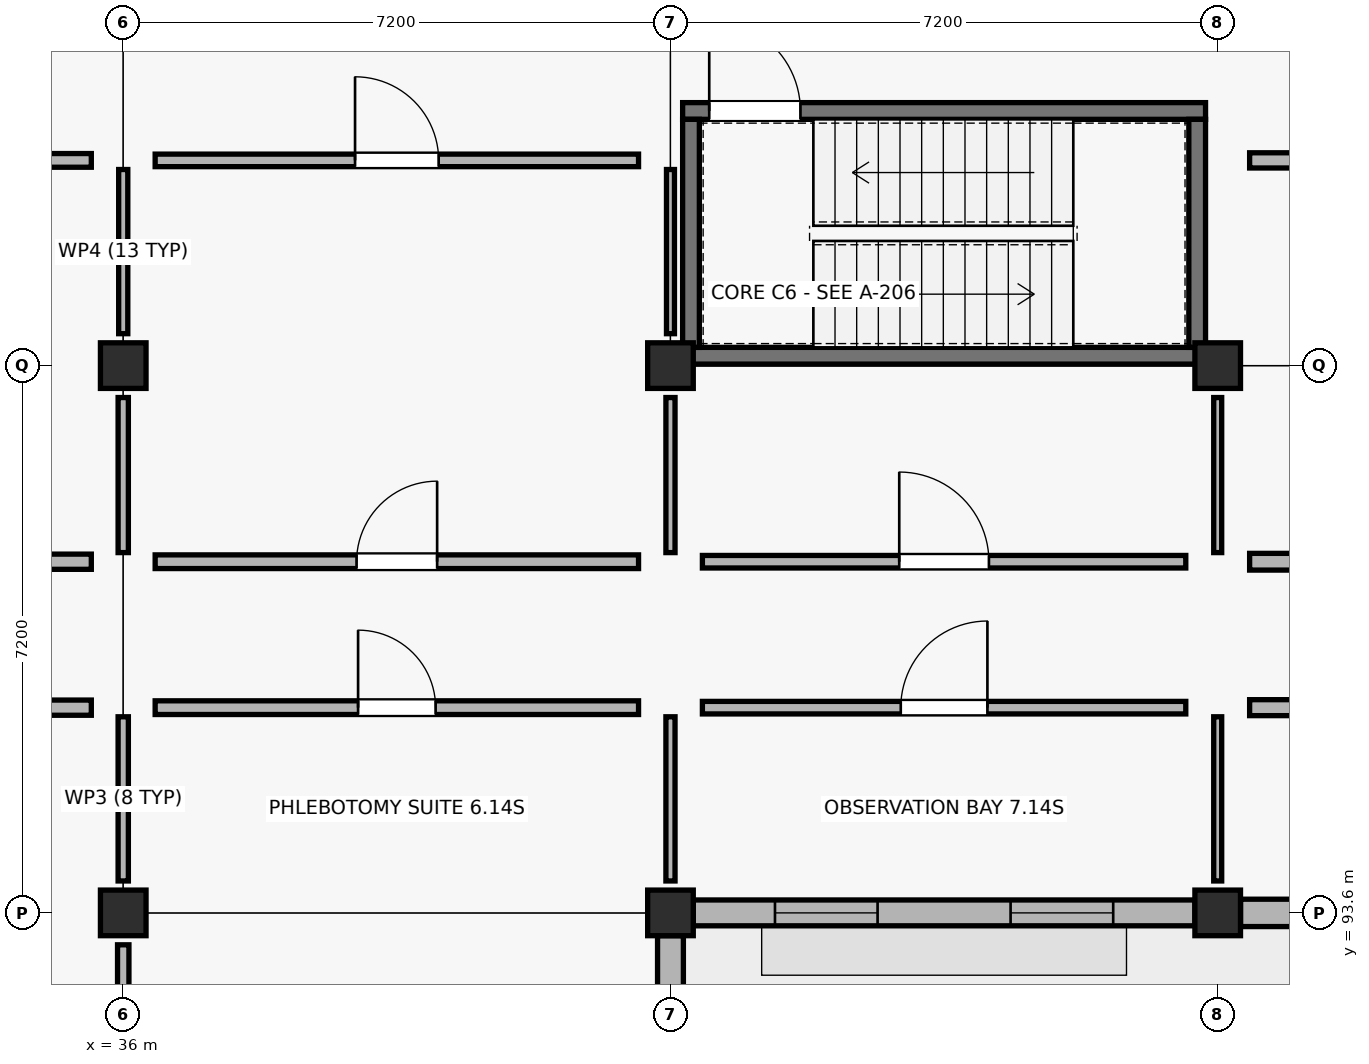
"""IFC4 building model, lengths in metres.
Left out: names, types, materials, properties, quantities, classifications, styles, units other than length and angle.
Written with IfcOpenShell. Run it as: python <this file> out.ifc"""

import sys

from ifc_helpers import new_model, si_unit, direction, frame, frame_2d, origin, origin_2d, place, context, subcontext, project, spatial, rectangle, extrude, element, fill, save


model = new_model("IFC4")
c1 = context("Model", 3, precision=1e-05, world=origin(), true_north=direction((0.0, 1.0)))
c2 = subcontext(c1, "Body", "Model", "MODEL_VIEW")
j1 = project(units=[si_unit("LENGTHUNIT", "METRE"), si_unit("PLANEANGLEUNIT", "RADIAN")], contexts=[c1])
p1 = place(None, origin())
s1 = spatial("IfcSite", under=j1, at=p1, CompositionType="ELEMENT")
p2 = place(p1, origin())
s2 = spatial("IfcBuilding", under=s1, at=p2, CompositionType="ELEMENT")
p3 = place(p2, origin())
s3 = spatial("IfcBuildingStorey", under=s2, at=p3, CompositionType="ELEMENT", Elevation=0.0)
for number, where, z_axis, x_axis in (
    (1, (36.0, 93.6, -0.25), (0.0, 0.0, 1.0), (1.0, 0.0, 0.0)),
    (2, (36.0, 100.8, -0.25), (0.0, 0.0, 1.0), (1.0, 0.0, 0.0)),
    (3, (43.2, 93.6, -0.25), (0.0, 0.0, 1.0), (1.0, 0.0, 0.0)),
    (4, (43.2, 100.8, -0.25), (0.0, 0.0, 1.0), (1.0, 0.0, 0.0)),
    (5, (50.4, 93.6, -0.25), (0.0, 0.0, 1.0), (1.0, 0.0, 0.0)),
    (6, (50.4, 100.8, -0.25), (0.0, 0.0, 1.0), (1.0, 0.0, 0.0)),
):
    element("IfcColumn", number, at=place(p3, frame(where, z_axis=z_axis, x_axis=x_axis)), inside=s3, PredefinedType="COLUMN", context=c2, shape_type="SweptSolid", body=[
        extrude(rectangle(XDim=0.6, YDim=0.6, at=origin_2d()), origin(), (0.0, 0.0, 1.0), 4.75),
    ])
p4 = place(p3, frame((43.2, 86.7, 0.0), z_axis=(0.0, 0.0, 1.0), x_axis=(0.0, 1.0, 0.0)))
e7 = element("IfcWall", 7, at=p4, inside=s3, PredefinedType="SOLIDWALL", context=c2, shape_type="SweptSolid", body=[
    extrude(rectangle(XDim=6.6, YDim=0.34, at=frame_2d((3.3, 0.0))), origin(), (0.0, 0.0, 1.0), 3.52),
])
p5 = place(p4, frame((0.85, 0.0, 0.9)))
e8 = element("IfcOpeningElement", 8, at=p5, cuts=e7, PredefinedType="OPENING", context=c2, shape_type="SweptSolid", body=[
    extrude(rectangle(XDim=1.8, YDim=1.62, at=frame_2d((0.9, 0.81))), frame((0.0, 0.18, 0.0), z_axis=(0.0, -1.0, 0.0), x_axis=(1.0, 0.0, 0.0)), (0.0, 0.0, 1.0), 0.36),
])
p6 = place(p4, frame((3.95, 0.0, 0.9)))
e9 = element("IfcOpeningElement", 9, at=p6, cuts=e7, PredefinedType="OPENING", context=c2, shape_type="SweptSolid", body=[
    extrude(rectangle(XDim=1.8, YDim=1.62, at=frame_2d((0.9, 0.81))), frame((0.0, 0.18, 0.0), z_axis=(0.0, -1.0, 0.0), x_axis=(1.0, 0.0, 0.0)), (0.0, 0.0, 1.0), 0.36),
])
p7 = place(p3, frame((43.5, 93.6, 0.0), z_axis=(0.0, 0.0, 1.0), x_axis=(1.0, 0.0, 0.0)))
e10 = element("IfcWall", 10, at=p7, inside=s3, PredefinedType="SOLIDWALL", context=c2, shape_type="SweptSolid", body=[
    extrude(rectangle(XDim=6.6, YDim=0.34, at=frame_2d((3.3, 0.0))), origin(), (0.0, 0.0, 1.0), 3.47),
])
p8 = place(p7, frame((1.075, 0.0, 0.9)))
e11 = element("IfcOpeningElement", 11, at=p8, cuts=e10, PredefinedType="OPENING", context=c2, shape_type="SweptSolid", body=[
    extrude(rectangle(XDim=1.35, YDim=1.75, at=frame_2d((0.675, 0.875))), frame((0.0, 0.18, 0.0), z_axis=(0.0, -1.0, 0.0), x_axis=(1.0, 0.0, 0.0)), (0.0, 0.0, 1.0), 0.36),
])
p9 = place(p7, frame((4.175, 0.0, 0.9)))
e12 = element("IfcOpeningElement", 12, at=p9, cuts=e10, PredefinedType="OPENING", context=c2, shape_type="SweptSolid", body=[
    extrude(rectangle(XDim=1.35, YDim=1.75, at=frame_2d((0.675, 0.875))), frame((0.0, 0.18, 0.0), z_axis=(0.0, -1.0, 0.0), x_axis=(1.0, 0.0, 0.0)), (0.0, 0.0, 1.0), 0.36),
])
p10 = place(p3, frame((50.7, 93.6, 0.0), z_axis=(0.0, 0.0, 1.0), x_axis=(1.0, 0.0, 0.0)))
e13 = element("IfcWall", 13, at=p10, inside=s3, PredefinedType="SOLIDWALL", context=c2, shape_type="SweptSolid", body=[
    extrude(rectangle(XDim=6.6, YDim=0.36, at=frame_2d((3.3, 0.0))), origin(), (0.0, 0.0, 1.0), 3.47),
])
p11 = place(p10, frame((0.675, 0.0, 0.9)))
e14 = element("IfcOpeningElement", 14, at=p11, cuts=e13, PredefinedType="OPENING", context=c2, shape_type="SweptSolid", body=[
    extrude(rectangle(XDim=2.15, YDim=1.75, at=frame_2d((1.075, 0.875))), frame((0.0, 0.19, 0.0), z_axis=(0.0, -1.0, 0.0), x_axis=(1.0, 0.0, 0.0)), (0.0, 0.0, 1.0), 0.38),
])
p12 = place(p10, frame((3.775, 0.0, 0.9)))
e15 = element("IfcOpeningElement", 15, at=p12, cuts=e13, PredefinedType="OPENING", context=c2, shape_type="SweptSolid", body=[
    extrude(rectangle(XDim=2.15, YDim=1.75, at=frame_2d((1.075, 0.875))), frame((0.0, 0.19, 0.0), z_axis=(0.0, -1.0, 0.0), x_axis=(1.0, 0.0, 0.0)), (0.0, 0.0, 1.0), 0.38),
])
p13 = place(p3, frame((43.36, 100.93, -0.25), z_axis=(0.0, 0.0, 1.0), x_axis=(1.0, 0.0, 0.0)))
e16 = element("IfcWall", 16, at=p13, inside=s3, PredefinedType="SHEAR", context=c2, shape_type="SweptSolid", body=[
    extrude(rectangle(XDim=6.88, YDim=0.22, at=frame_2d((3.44, 0.0))), origin(), (0.0, 0.0, 1.0), 4.47),
])
p14 = place(p3, frame((43.36, 104.15, -0.25), z_axis=(0.0, 0.0, 1.0), x_axis=(1.0, 0.0, 0.0)))
e17 = element("IfcWall", 17, at=p14, inside=s3, PredefinedType="SHEAR", context=c2, shape_type="SweptSolid", body=[
    extrude(rectangle(XDim=6.88, YDim=0.22, at=frame_2d((3.44, 0.0))), origin(), (0.0, 0.0, 1.0), 4.47),
])
p15 = place(p14, frame((0.35, 0.0, 0.25)))
e18 = element("IfcOpeningElement", 18, at=p15, cuts=e17, PredefinedType="OPENING", context=c2, shape_type="SweptSolid", body=[
    extrude(rectangle(XDim=1.2, YDim=2.15, at=frame_2d((0.6, 1.075))), frame((0.0, 0.12, 0.0), z_axis=(0.0, -1.0, 0.0), x_axis=(1.0, 0.0, 0.0)), (0.0, 0.0, 1.0), 0.24),
])
for number, where, z_axis, x_axis in (
    (19, (43.47, 101.04, -0.25), (0.0, 0.0, 1.0), (0.0, 1.0, 0.0)),
    (20, (50.13, 101.04, -0.25), (0.0, 0.0, 1.0), (0.0, 1.0, 0.0)),
):
    element("IfcWall", number, at=place(p3, frame(where, z_axis=z_axis, x_axis=x_axis)), inside=s3, PredefinedType="SHEAR", context=c2, shape_type="SweptSolid", body=[
        extrude(rectangle(XDim=3.0, YDim=0.22, at=frame_2d((1.5, 0.0))), origin(), (0.0, 0.0, 1.0), 4.47),
    ])
p16 = place(p3, frame((36.0, 91.14, 0.0), z_axis=(0.0, 0.0, 1.0), x_axis=(0.0, 1.0, 0.0)))
e21 = element("IfcWall", 21, at=p16, inside=s3, PredefinedType="PARTITIONING", context=c2, shape_type="SweptSolid", body=[
    extrude(rectangle(XDim=2.04, YDim=0.15, at=frame_2d((1.02, 0.0))), origin(), (0.0, 0.0, 1.0), 3.36),
])
p17 = place(p3, frame((29.22, 96.3, 0.0), z_axis=(0.0, 0.0, 1.0), x_axis=(1.0, 0.0, 0.0)))
e22 = element("IfcWall", 22, at=p17, inside=s3, PredefinedType="SOLIDWALL", context=c2, shape_type="SweptSolid", body=[
    extrude(rectangle(XDim=6.36, YDim=0.2, at=frame_2d((3.18, 0.0))), origin(), (0.0, 0.0, 1.0), 3.36),
])
p18 = place(p17, frame((2.51, 0.0, 0.0)))
e23 = element("IfcOpeningElement", 23, at=p18, cuts=e22, PredefinedType="OPENING", context=c2, shape_type="SweptSolid", body=[
    extrude(rectangle(XDim=1.34, YDim=2.09, at=frame_2d((0.67, 1.045))), frame((0.0, 0.11, 0.0), z_axis=(0.0, -1.0, 0.0), x_axis=(1.0, 0.0, 0.0)), (0.0, 0.0, 1.0), 0.22),
])
p19 = place(p3, frame((36.0, 94.02, 0.0), z_axis=(0.0, 0.0, 1.0), x_axis=(0.0, 1.0, 0.0)))
e24 = element("IfcWall", 24, at=p19, inside=s3, PredefinedType="PARTITIONING", context=c2, shape_type="SweptSolid", body=[
    extrude(rectangle(XDim=2.16, YDim=0.135, at=frame_2d((1.08, 0.0))), origin(), (0.0, 0.0, 1.0), 3.36),
])
p20 = place(p3, frame((29.22, 98.22, 0.0), z_axis=(0.0, 0.0, 1.0), x_axis=(1.0, 0.0, 0.0)))
e25 = element("IfcWall", 25, at=p20, inside=s3, PredefinedType="SOLIDWALL", context=c2, shape_type="SweptSolid", body=[
    extrude(rectangle(XDim=6.36, YDim=0.2, at=frame_2d((3.18, 0.0))), origin(), (0.0, 0.0, 1.0), 3.36),
])
p21 = place(p20, frame((2.49, 0.0, 0.0)))
e26 = element("IfcOpeningElement", 26, at=p21, cuts=e25, PredefinedType="OPENING", context=c2, shape_type="SweptSolid", body=[
    extrude(rectangle(XDim=1.38, YDim=2.09, at=frame_2d((0.69, 1.045))), frame((0.0, 0.11, 0.0), z_axis=(0.0, -1.0, 0.0), x_axis=(1.0, 0.0, 0.0)), (0.0, 0.0, 1.0), 0.22),
])
p22 = place(p3, frame((36.0, 98.34, 0.0), z_axis=(0.0, 0.0, 1.0), x_axis=(0.0, 1.0, 0.0)))
e27 = element("IfcWall", 27, at=p22, inside=s3, PredefinedType="PARTITIONING", context=c2, shape_type="SweptSolid", body=[
    extrude(rectangle(XDim=2.04, YDim=0.135, at=frame_2d((1.02, 0.0))), origin(), (0.0, 0.0, 1.0), 3.36),
])
p23 = place(p3, frame((29.22, 103.5, 0.0), z_axis=(0.0, 0.0, 1.0), x_axis=(1.0, 0.0, 0.0)))
e28 = element("IfcWall", 28, at=p23, inside=s3, PredefinedType="PARTITIONING", context=c2, shape_type="SweptSolid", body=[
    extrude(rectangle(XDim=6.36, YDim=0.18, at=frame_2d((3.18, 0.0))), origin(), (0.0, 0.0, 1.0), 3.36),
])
p24 = place(p23, frame((2.47, 0.0, 0.0)))
e29 = element("IfcOpeningElement", 29, at=p24, cuts=e28, PredefinedType="OPENING", context=c2, shape_type="SweptSolid", body=[
    extrude(rectangle(XDim=1.42, YDim=2.09, at=frame_2d((0.71, 1.045))), frame((0.0, 0.1, 0.0), z_axis=(0.0, -1.0, 0.0), x_axis=(1.0, 0.0, 0.0)), (0.0, 0.0, 1.0), 0.2),
])
p25 = place(p3, frame((36.0, 101.22, 0.0), z_axis=(0.0, 0.0, 1.0), x_axis=(0.0, 1.0, 0.0)))
e30 = element("IfcWall", 30, at=p25, inside=s3, PredefinedType="PARTITIONING", context=c2, shape_type="SweptSolid", body=[
    extrude(rectangle(XDim=2.16, YDim=0.12, at=frame_2d((1.08, 0.0))), origin(), (0.0, 0.0, 1.0), 3.36),
])
p26 = place(p3, frame((36.42, 96.3, 0.0), z_axis=(0.0, 0.0, 1.0), x_axis=(1.0, 0.0, 0.0)))
e31 = element("IfcWall", 31, at=p26, inside=s3, PredefinedType="PARTITIONING", context=c2, shape_type="SweptSolid", body=[
    extrude(rectangle(XDim=6.36, YDim=0.18, at=frame_2d((3.18, 0.0))), origin(), (0.0, 0.0, 1.0), 3.36),
])
p27 = place(p26, frame((2.67, 0.0, 0.0)))
e32 = element("IfcOpeningElement", 32, at=p27, cuts=e31, PredefinedType="OPENING", context=c2, shape_type="SweptSolid", body=[
    extrude(rectangle(XDim=1.02, YDim=2.14, at=frame_2d((0.51, 1.07))), frame((0.0, 0.1, 0.0), z_axis=(0.0, -1.0, 0.0), x_axis=(1.0, 0.0, 0.0)), (0.0, 0.0, 1.0), 0.2),
])
p28 = place(p3, frame((43.2, 94.02, 0.0), z_axis=(0.0, 0.0, 1.0), x_axis=(0.0, 1.0, 0.0)))
e33 = element("IfcWall", 33, at=p28, inside=s3, PredefinedType="PARTITIONING", context=c2, shape_type="SweptSolid", body=[
    extrude(rectangle(XDim=2.16, YDim=0.12, at=frame_2d((1.08, 0.0))), origin(), (0.0, 0.0, 1.0), 3.36),
])
p29 = place(p3, frame((36.42, 98.22, 0.0), z_axis=(0.0, 0.0, 1.0), x_axis=(1.0, 0.0, 0.0)))
e34 = element("IfcWall", 34, at=p29, inside=s3, PredefinedType="PARTITIONING", context=c2, shape_type="SweptSolid", body=[
    extrude(rectangle(XDim=6.36, YDim=0.18, at=frame_2d((3.18, 0.0))), origin(), (0.0, 0.0, 1.0), 3.36),
])
p30 = place(p29, frame((2.65, 0.0, 0.0)))
e35 = element("IfcOpeningElement", 35, at=p30, cuts=e34, PredefinedType="OPENING", context=c2, shape_type="SweptSolid", body=[
    extrude(rectangle(XDim=1.06, YDim=2.14, at=frame_2d((0.53, 1.07))), frame((0.0, 0.1, 0.0), z_axis=(0.0, -1.0, 0.0), x_axis=(1.0, 0.0, 0.0)), (0.0, 0.0, 1.0), 0.2),
])
p31 = place(p3, frame((43.2, 98.34, 0.0), z_axis=(0.0, 0.0, 1.0), x_axis=(0.0, 1.0, 0.0)))
e36 = element("IfcWall", 36, at=p31, inside=s3, PredefinedType="PARTITIONING", context=c2, shape_type="SweptSolid", body=[
    extrude(rectangle(XDim=2.04, YDim=0.12, at=frame_2d((1.02, 0.0))), origin(), (0.0, 0.0, 1.0), 3.36),
])
p32 = place(p3, frame((36.42, 103.5, 0.0), z_axis=(0.0, 0.0, 1.0), x_axis=(1.0, 0.0, 0.0)))
e37 = element("IfcWall", 37, at=p32, inside=s3, PredefinedType="PARTITIONING", context=c2, shape_type="SweptSolid", body=[
    extrude(rectangle(XDim=6.36, YDim=0.165, at=frame_2d((3.18, 0.0))), origin(), (0.0, 0.0, 1.0), 3.36),
])
p33 = place(p32, frame((2.63, 0.0, 0.0)))
e38 = element("IfcOpeningElement", 38, at=p33, cuts=e37, PredefinedType="OPENING", context=c2, shape_type="SweptSolid", body=[
    extrude(rectangle(XDim=1.1, YDim=2.14, at=frame_2d((0.55, 1.07))), frame((0.0, 0.093, 0.0), z_axis=(0.0, -1.0, 0.0), x_axis=(1.0, 0.0, 0.0)), (0.0, 0.0, 1.0), 0.185),
])
p34 = place(p3, frame((43.2, 101.22, 0.0), z_axis=(0.0, 0.0, 1.0), x_axis=(0.0, 1.0, 0.0)))
e39 = element("IfcWall", 39, at=p34, inside=s3, PredefinedType="PARTITIONING", context=c2, shape_type="SweptSolid", body=[
    extrude(rectangle(XDim=2.16, YDim=0.105, at=frame_2d((1.08, 0.0))), origin(), (0.0, 0.0, 1.0), 3.36),
])
p35 = place(p3, frame((43.62, 96.3, 0.0), z_axis=(0.0, 0.0, 1.0), x_axis=(1.0, 0.0, 0.0)))
e40 = element("IfcWall", 40, at=p35, inside=s3, PredefinedType="PARTITIONING", context=c2, shape_type="SweptSolid", body=[
    extrude(rectangle(XDim=6.36, YDim=0.165, at=frame_2d((3.18, 0.0))), origin(), (0.0, 0.0, 1.0), 3.36),
])
p36 = place(p35, frame((2.61, 0.0, 0.0)))
e41 = element("IfcOpeningElement", 41, at=p36, cuts=e40, PredefinedType="OPENING", context=c2, shape_type="SweptSolid", body=[
    extrude(rectangle(XDim=1.14, YDim=2.14, at=frame_2d((0.57, 1.07))), frame((0.0, 0.093, 0.0), z_axis=(0.0, -1.0, 0.0), x_axis=(1.0, 0.0, 0.0)), (0.0, 0.0, 1.0), 0.185),
])
p37 = place(p3, frame((50.4, 94.02, 0.0), z_axis=(0.0, 0.0, 1.0), x_axis=(0.0, 1.0, 0.0)))
e42 = element("IfcWall", 42, at=p37, inside=s3, PredefinedType="PARTITIONING", context=c2, shape_type="SweptSolid", body=[
    extrude(rectangle(XDim=2.16, YDim=0.105, at=frame_2d((1.08, 0.0))), origin(), (0.0, 0.0, 1.0), 3.36),
])
p38 = place(p3, frame((43.62, 98.22, 0.0), z_axis=(0.0, 0.0, 1.0), x_axis=(1.0, 0.0, 0.0)))
e43 = element("IfcWall", 43, at=p38, inside=s3, PredefinedType="PARTITIONING", context=c2, shape_type="SweptSolid", body=[
    extrude(rectangle(XDim=6.36, YDim=0.165, at=frame_2d((3.18, 0.0))), origin(), (0.0, 0.0, 1.0), 3.36),
])
p39 = place(p38, frame((2.59, 0.0, 0.0)))
e44 = element("IfcOpeningElement", 44, at=p39, cuts=e43, PredefinedType="OPENING", context=c2, shape_type="SweptSolid", body=[
    extrude(rectangle(XDim=1.18, YDim=2.14, at=frame_2d((0.59, 1.07))), frame((0.0, 0.093, 0.0), z_axis=(0.0, -1.0, 0.0), x_axis=(1.0, 0.0, 0.0)), (0.0, 0.0, 1.0), 0.185),
])
p40 = place(p3, frame((50.4, 98.34, 0.0), z_axis=(0.0, 0.0, 1.0), x_axis=(0.0, 1.0, 0.0)))
e45 = element("IfcWall", 45, at=p40, inside=s3, PredefinedType="PARTITIONING", context=c2, shape_type="SweptSolid", body=[
    extrude(rectangle(XDim=2.04, YDim=0.105, at=frame_2d((1.02, 0.0))), origin(), (0.0, 0.0, 1.0), 3.36),
])
p41 = place(p3, frame((50.82, 96.3, 0.0), z_axis=(0.0, 0.0, 1.0), x_axis=(1.0, 0.0, 0.0)))
e46 = element("IfcWall", 46, at=p41, inside=s3, PredefinedType="PLUMBINGWALL", context=c2, shape_type="SweptSolid", body=[
    extrude(rectangle(XDim=6.36, YDim=0.21, at=frame_2d((3.18, 0.0))), origin(), (0.0, 0.0, 1.0), 3.36),
])
p42 = place(p41, frame((2.53, 0.0, 0.0)))
e47 = element("IfcOpeningElement", 47, at=p42, cuts=e46, PredefinedType="OPENING", context=c2, shape_type="SweptSolid", body=[
    extrude(rectangle(XDim=1.3, YDim=2.14, at=frame_2d((0.65, 1.07))), frame((0.0, 0.115, 0.0), z_axis=(0.0, -1.0, 0.0), x_axis=(1.0, 0.0, 0.0)), (0.0, 0.0, 1.0), 0.23),
])
p43 = place(p3, frame((50.82, 98.22, 0.0), z_axis=(0.0, 0.0, 1.0), x_axis=(1.0, 0.0, 0.0)))
e48 = element("IfcWall", 48, at=p43, inside=s3, PredefinedType="SOLIDWALL", context=c2, shape_type="SweptSolid", body=[
    extrude(rectangle(XDim=6.36, YDim=0.22, at=frame_2d((3.18, 0.0))), origin(), (0.0, 0.0, 1.0), 3.36),
])
p44 = place(p43, frame((2.51, 0.0, 0.0)))
e49 = element("IfcOpeningElement", 49, at=p44, cuts=e48, PredefinedType="OPENING", context=c2, shape_type="SweptSolid", body=[
    extrude(rectangle(XDim=1.34, YDim=2.14, at=frame_2d((0.67, 1.07))), frame((0.0, 0.12, 0.0), z_axis=(0.0, -1.0, 0.0), x_axis=(1.0, 0.0, 0.0)), (0.0, 0.0, 1.0), 0.24),
])
p45 = place(p3, frame((50.82, 103.5, 0.0), z_axis=(0.0, 0.0, 1.0), x_axis=(1.0, 0.0, 0.0)))
e50 = element("IfcWall", 50, at=p45, inside=s3, PredefinedType="SOLIDWALL", context=c2, shape_type="SweptSolid", body=[
    extrude(rectangle(XDim=6.36, YDim=0.2, at=frame_2d((3.18, 0.0))), origin(), (0.0, 0.0, 1.0), 3.36),
])
p46 = place(p45, frame((2.49, 0.0, 0.0)))
e51 = element("IfcOpeningElement", 51, at=p46, cuts=e50, PredefinedType="OPENING", context=c2, shape_type="SweptSolid", body=[
    extrude(rectangle(XDim=1.38, YDim=2.14, at=frame_2d((0.69, 1.07))), frame((0.0, 0.11, 0.0), z_axis=(0.0, -1.0, 0.0), x_axis=(1.0, 0.0, 0.0)), (0.0, 0.0, 1.0), 0.22),
])
p47 = place(p8, origin())
e52 = element("IfcWindow", 52, at=p47, inside=s3, PartitioningType="SINGLE_PANEL", PredefinedType="WINDOW", context=c2, shape_type="SweptSolid", body=[
    extrude(rectangle(XDim=1.35, YDim=1.75, at=frame_2d((0.675, 0.875))), frame((0.0, 0.03, 0.0), z_axis=(0.0, -1.0, 0.0), x_axis=(1.0, 0.0, 0.0)), (0.0, 0.0, 1.0), 0.06),
])
fill(e11, e52)
p48 = place(p9, origin())
e53 = element("IfcWindow", 53, at=p48, inside=s3, PartitioningType="SINGLE_PANEL", PredefinedType="WINDOW", context=c2, shape_type="SweptSolid", body=[
    extrude(rectangle(XDim=1.35, YDim=1.75, at=frame_2d((0.675, 0.875))), frame((0.0, 0.03, 0.0), z_axis=(0.0, -1.0, 0.0), x_axis=(1.0, 0.0, 0.0)), (0.0, 0.0, 1.0), 0.06),
])
fill(e12, e53)
p49 = place(p15, origin())
e54 = element("IfcDoor", 54, at=p49, inside=s3, OperationType="SINGLE_SWING_LEFT", PredefinedType="DOOR", context=c2, shape_type="SweptSolid", body=[
    extrude(rectangle(XDim=1.2, YDim=2.15, at=frame_2d((0.6, 1.075))), frame((0.0, 0.025, 0.0), z_axis=(0.0, -1.0, 0.0), x_axis=(1.0, 0.0, 0.0)), (0.0, 0.0, 1.0), 0.05),
])
fill(e18, e54)
p50 = place(p27, origin())
e55 = element("IfcDoor", 55, at=p50, inside=s3, OperationType="SINGLE_SWING_LEFT", PredefinedType="DOOR", context=c2, shape_type="SweptSolid", body=[
    extrude(rectangle(XDim=1.02, YDim=2.14, at=frame_2d((0.51, 1.07))), frame((0.0, 0.025, 0.0), z_axis=(0.0, -1.0, 0.0), x_axis=(1.0, 0.0, 0.0)), (0.0, 0.0, 1.0), 0.05),
])
fill(e32, e55)
p51 = place(p30, origin())
e56 = element("IfcDoor", 56, at=p51, inside=s3, OperationType="SINGLE_SWING_RIGHT", PredefinedType="DOOR", context=c2, shape_type="SweptSolid", body=[
    extrude(rectangle(XDim=1.06, YDim=2.14, at=frame_2d((0.53, 1.07))), frame((0.0, 0.025, 0.0), z_axis=(0.0, -1.0, 0.0), x_axis=(1.0, 0.0, 0.0)), (0.0, 0.0, 1.0), 0.05),
])
fill(e35, e56)
p52 = place(p33, origin())
e57 = element("IfcDoor", 57, at=p52, inside=s3, OperationType="SINGLE_SWING_LEFT", PredefinedType="DOOR", context=c2, shape_type="SweptSolid", body=[
    extrude(rectangle(XDim=1.1, YDim=2.14, at=frame_2d((0.55, 1.07))), frame((0.0, 0.025, 0.0), z_axis=(0.0, -1.0, 0.0), x_axis=(1.0, 0.0, 0.0)), (0.0, 0.0, 1.0), 0.05),
])
fill(e38, e57)
p53 = place(p36, origin())
e58 = element("IfcDoor", 58, at=p53, inside=s3, OperationType="SINGLE_SWING_RIGHT", PredefinedType="DOOR", context=c2, shape_type="SweptSolid", body=[
    extrude(rectangle(XDim=1.14, YDim=2.14, at=frame_2d((0.57, 1.07))), frame((0.0, 0.025, 0.0), z_axis=(0.0, -1.0, 0.0), x_axis=(1.0, 0.0, 0.0)), (0.0, 0.0, 1.0), 0.05),
])
fill(e41, e58)
p54 = place(p39, origin())
e59 = element("IfcDoor", 59, at=p54, inside=s3, OperationType="SINGLE_SWING_LEFT", PredefinedType="DOOR", context=c2, shape_type="SweptSolid", body=[
    extrude(rectangle(XDim=1.18, YDim=2.14, at=frame_2d((0.59, 1.07))), frame((0.0, 0.025, 0.0), z_axis=(0.0, -1.0, 0.0), x_axis=(1.0, 0.0, 0.0)), (0.0, 0.0, 1.0), 0.05),
])
fill(e44, e59)
save(model, sys.argv[1])
